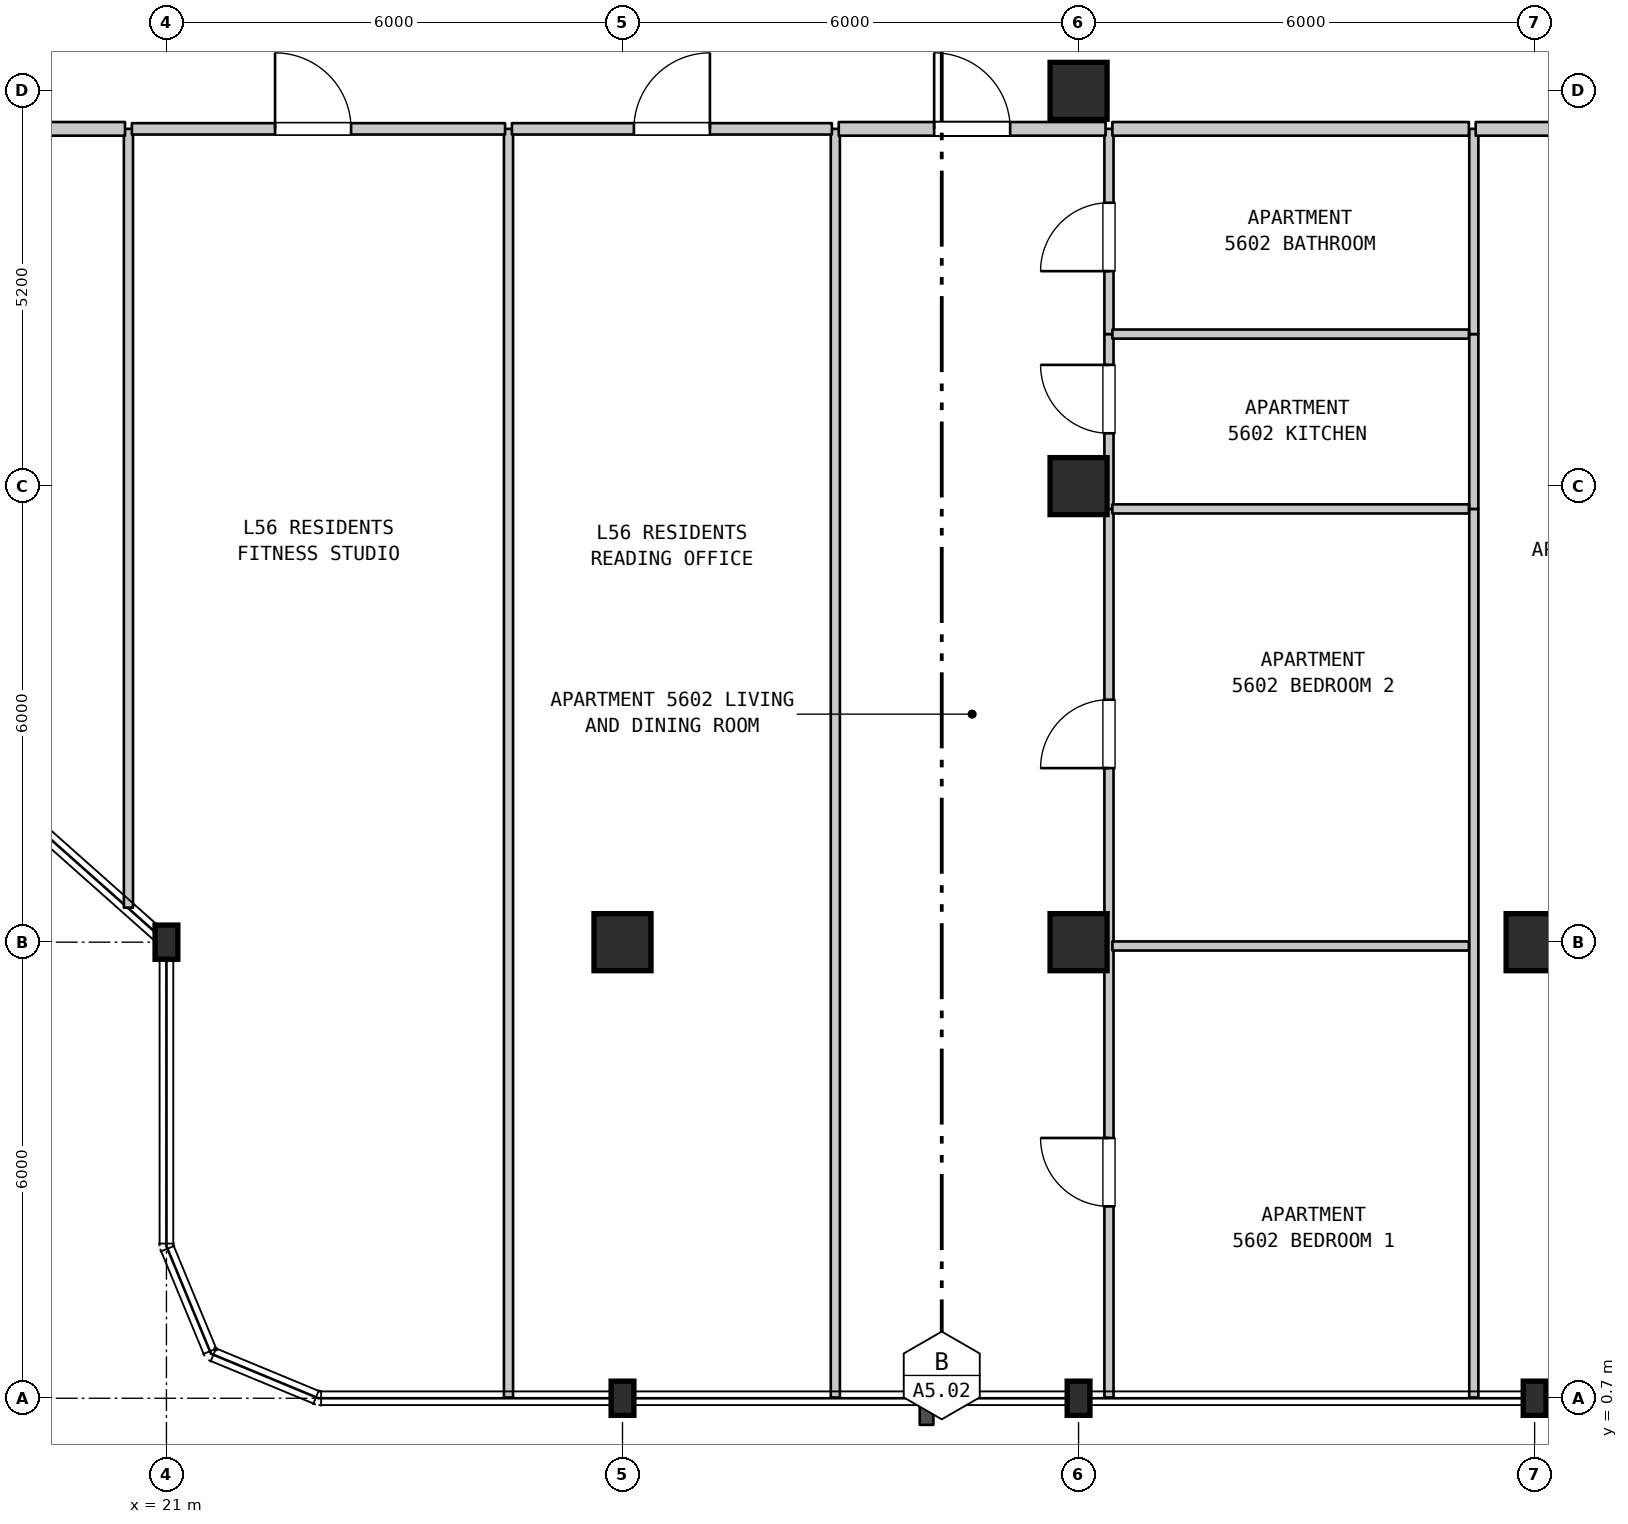
"""IFC4 building model, lengths in metres.
Left out: names, types, materials, properties, quantities, classifications, styles, units other than length and angle.
Written with IfcOpenShell. Run it as: python <this file> out.ifc"""

import sys

from ifc_helpers import new_model, si_unit, direction, frame, frame_2d, origin, origin_2d, place, context, subcontext, project, spatial, rectangle, i_section, extrude, element, fill, save


model = new_model("IFC4")
c1 = context("Model", 3, precision=1e-05, world=origin(), true_north=direction((0.0, 1.0)))
c2 = subcontext(c1, "Body", "Model", "MODEL_VIEW")
j1 = project(units=[si_unit("LENGTHUNIT", "METRE"), si_unit("PLANEANGLEUNIT", "RADIAN")], contexts=[c1])
p1 = place(None, origin())
s1 = spatial("IfcSite", under=j1, at=p1, CompositionType="ELEMENT")
p2 = place(p1, origin())
s2 = spatial("IfcBuilding", under=s1, at=p2, CompositionType="ELEMENT")
p3 = place(p2, frame((0.0, 0.0, 226.5)))
s3 = spatial("IfcBuildingStorey", under=s2, at=p3, CompositionType="ELEMENT", Elevation=226.5)
for number, where, z_axis, x_axis in (
    (1, (21.0, 6.7, 0.0), (0.0, 0.0, 1.0), (1.0, 0.0, 0.0)),
    (2, (27.0, 0.7, 0.0), (0.0, 0.0, 1.0), (1.0, 0.0, 0.0)),
):
    element("IfcColumn", number, at=place(p3, frame(where, z_axis=z_axis, x_axis=x_axis)), inside=s3, PredefinedType="COLUMN", context=c2, shape_type="SweptSolid", body=[
        extrude(i_section(OverallWidth=0.3, OverallDepth=0.45, WebThickness=0.014, FlangeThickness=0.026, FilletRadius=0.027, at=origin_2d()), origin(), (0.0, 0.0, 1.0), 3.7),
    ])
p4 = place(p3, frame((27.0, 6.7, 0.0), z_axis=(0.0, 0.0, 1.0), x_axis=(1.0, 0.0, 0.0)))
e3 = element("IfcColumn", 3, at=p4, inside=s3, PredefinedType="COLUMN", context=c2, shape_type="SweptSolid", body=[
    extrude(rectangle(XDim=0.75, YDim=0.75, at=origin_2d()), origin(), (0.0, 0.0, 1.0), 3.7),
])
p5 = place(p3, frame((33.0, 0.7, 0.0), z_axis=(0.0, 0.0, 1.0), x_axis=(1.0, 0.0, 0.0)))
e4 = element("IfcColumn", 4, at=p5, inside=s3, PredefinedType="COLUMN", context=c2, shape_type="SweptSolid", body=[
    extrude(i_section(OverallWidth=0.3, OverallDepth=0.45, WebThickness=0.014, FlangeThickness=0.026, FilletRadius=0.027, at=origin_2d()), origin(), (0.0, 0.0, 1.0), 3.7),
])
for number, where, z_axis, x_axis in (
    (5, (33.0, 6.7, 0.0), (0.0, 0.0, 1.0), (1.0, 0.0, 0.0)),
    (6, (33.0, 12.7, 0.0), (0.0, 0.0, 1.0), (1.0, 0.0, 0.0)),
    (7, (33.0, 17.9, 0.0), (0.0, 0.0, 1.0), (1.0, 0.0, 0.0)),
):
    element("IfcColumn", number, at=place(p3, frame(where, z_axis=z_axis, x_axis=x_axis)), inside=s3, PredefinedType="COLUMN", context=c2, shape_type="SweptSolid", body=[
        extrude(rectangle(XDim=0.75, YDim=0.75, at=origin_2d()), origin(), (0.0, 0.0, 1.0), 3.7),
    ])
p6 = place(p3, frame((39.0, 0.7, 0.0), z_axis=(0.0, 0.0, 1.0), x_axis=(1.0, 0.0, 0.0)))
e8 = element("IfcColumn", 8, at=p6, inside=s3, PredefinedType="COLUMN", context=c2, shape_type="SweptSolid", body=[
    extrude(i_section(OverallWidth=0.3, OverallDepth=0.45, WebThickness=0.014, FlangeThickness=0.026, FilletRadius=0.027, at=origin_2d()), origin(), (0.0, 0.0, 1.0), 3.7),
])
p7 = place(p3, frame((39.0, 6.7, 0.0), z_axis=(0.0, 0.0, 1.0), x_axis=(1.0, 0.0, 0.0)))
e9 = element("IfcColumn", 9, at=p7, inside=s3, PredefinedType="COLUMN", context=c2, shape_type="SweptSolid", body=[
    extrude(rectangle(XDim=0.75, YDim=0.75, at=origin_2d()), origin(), (0.0, 0.0, 1.0), 3.7),
])
p8 = place(p3, frame((20.5, 7.154, 0.0), z_axis=(0.0, 0.0, 1.0), x_axis=(0.0, 1.0, 0.0)))
e10 = element("IfcWall", 10, at=p8, inside=s3, PredefinedType="PARTITIONING", context=c2, shape_type="SweptSolid", body=[
    extrude(rectangle(XDim=10.246, YDim=0.12, at=frame_2d((5.123, 0.0))), origin(), (0.0, 0.0, 1.0), 3.39),
])
for number, where, z_axis, x_axis in (
    (11, (25.5, 0.71, 0.0), (0.0, 0.0, 1.0), (0.0, 1.0, 0.0)),
    (12, (29.8, 0.71, 0.0), (0.0, 0.0, 1.0), (0.0, 1.0, 0.0)),
):
    element("IfcWall", number, at=place(p3, frame(where, z_axis=z_axis, x_axis=x_axis)), inside=s3, PredefinedType="PARTITIONING", context=c2, shape_type="SweptSolid", body=[
        extrude(rectangle(XDim=16.69, YDim=0.12, at=frame_2d((8.345, 0.0))), origin(), (0.0, 0.0, 1.0), 3.39),
    ])
p9 = place(p3, frame((33.4, 0.71, 0.0), z_axis=(0.0, 0.0, 1.0), x_axis=(0.0, 1.0, 0.0)))
e13 = element("IfcWall", 13, at=p9, inside=s3, PredefinedType="PARTITIONING", context=c2, shape_type="SweptSolid", body=[
    extrude(rectangle(XDim=11.69, YDim=0.12, at=frame_2d((5.845, 0.0))), origin(), (0.0, 0.0, 1.0), 3.39),
])
p10 = place(p9, frame((2.514, 0.0, 0.0)))
e14 = element("IfcOpeningElement", 14, at=p10, cuts=e13, PredefinedType="OPENING", context=c2, shape_type="SweptSolid", body=[
    extrude(rectangle(XDim=0.9, YDim=2.15, at=frame_2d((0.45, 1.075))), frame((0.0, 0.07, 0.0), z_axis=(0.0, -1.0, 0.0), x_axis=(1.0, 0.0, 0.0)), (0.0, 0.0, 1.0), 0.14),
])
p11 = place(p9, frame((8.28, 0.0, 0.0)))
e15 = element("IfcOpeningElement", 15, at=p11, cuts=e13, PredefinedType="OPENING", context=c2, shape_type="SweptSolid", body=[
    extrude(rectangle(XDim=0.9, YDim=2.15, at=frame_2d((0.45, 1.075))), frame((0.0, 0.07, 0.0), z_axis=(0.0, -1.0, 0.0), x_axis=(1.0, 0.0, 0.0)), (0.0, 0.0, 1.0), 0.14),
])
p12 = place(p3, frame((33.4, 12.4, 0.0), z_axis=(0.0, 0.0, 1.0), x_axis=(0.0, 1.0, 0.0)))
e16 = element("IfcWall", 16, at=p12, inside=s3, PredefinedType="PARTITIONING", context=c2, shape_type="SweptSolid", body=[
    extrude(rectangle(XDim=2.3, YDim=0.12, at=frame_2d((1.15, 0.0))), origin(), (0.0, 0.0, 1.0), 3.39),
])
p13 = place(p12, frame((0.995, 0.0, 0.0)))
e17 = element("IfcOpeningElement", 17, at=p13, cuts=e16, PredefinedType="OPENING", context=c2, shape_type="SweptSolid", body=[
    extrude(rectangle(XDim=0.9, YDim=2.15, at=frame_2d((0.45, 1.075))), frame((0.0, 0.07, 0.0), z_axis=(0.0, -1.0, 0.0), x_axis=(1.0, 0.0, 0.0)), (0.0, 0.0, 1.0), 0.14),
])
p14 = place(p3, frame((33.4, 14.7, 0.0), z_axis=(0.0, 0.0, 1.0), x_axis=(0.0, 1.0, 0.0)))
e18 = element("IfcWall", 18, at=p14, inside=s3, PredefinedType="PARTITIONING", context=c2, shape_type="SweptSolid", body=[
    extrude(rectangle(XDim=2.7, YDim=0.12, at=frame_2d((1.35, 0.0))), origin(), (0.0, 0.0, 1.0), 3.39),
])
p15 = place(p14, frame((0.828, 0.0, 0.0)))
e19 = element("IfcOpeningElement", 19, at=p15, cuts=e18, PredefinedType="OPENING", context=c2, shape_type="SweptSolid", body=[
    extrude(rectangle(XDim=0.9, YDim=2.1, at=frame_2d((0.45, 1.05))), frame((0.0, 0.07, 0.0), z_axis=(0.0, -1.0, 0.0), x_axis=(1.0, 0.0, 0.0)), (0.0, 0.0, 1.0), 0.14),
])
p16 = place(p3, frame((38.2, 0.71, 0.0), z_axis=(0.0, 0.0, 1.0), x_axis=(0.0, 1.0, 0.0)))
e20 = element("IfcWall", 20, at=p16, inside=s3, PredefinedType="PARTITIONING", context=c2, shape_type="SweptSolid", body=[
    extrude(rectangle(XDim=11.69, YDim=0.12, at=frame_2d((5.845, 0.0))), origin(), (0.0, 0.0, 1.0), 3.39),
])
p17 = place(p3, frame((38.2, 12.4, 0.0), z_axis=(0.0, 0.0, 1.0), x_axis=(0.0, 1.0, 0.0)))
e21 = element("IfcWall", 21, at=p17, inside=s3, PredefinedType="PARTITIONING", context=c2, shape_type="SweptSolid", body=[
    extrude(rectangle(XDim=2.3, YDim=0.12, at=frame_2d((1.15, 0.0))), origin(), (0.0, 0.0, 1.0), 3.39),
])
p18 = place(p3, frame((38.2, 14.7, 0.0), z_axis=(0.0, 0.0, 1.0), x_axis=(0.0, 1.0, 0.0)))
e22 = element("IfcWall", 22, at=p18, inside=s3, PredefinedType="PARTITIONING", context=c2, shape_type="SweptSolid", body=[
    extrude(rectangle(XDim=2.7, YDim=0.12, at=frame_2d((1.35, 0.0))), origin(), (0.0, 0.0, 1.0), 3.39),
])
p19 = place(p3, frame((33.445, 6.65, 0.0), z_axis=(0.0, 0.0, 1.0), x_axis=(1.0, 0.0, 0.0)))
e23 = element("IfcWall", 23, at=p19, inside=s3, PredefinedType="PARTITIONING", context=c2, shape_type="SweptSolid", body=[
    extrude(rectangle(XDim=4.69, YDim=0.12, at=frame_2d((2.345, 0.0))), origin(), (0.0, 0.0, 1.0), 3.09),
])
for number, where, z_axis, x_axis in (
    (24, (33.445, 12.4, 0.0), (0.0, 0.0, 1.0), (1.0, 0.0, 0.0)),
    (25, (33.445, 14.7, 0.0), (0.0, 0.0, 1.0), (1.0, 0.0, 0.0)),
):
    element("IfcWall", number, at=place(p3, frame(where, z_axis=z_axis, x_axis=x_axis)), inside=s3, PredefinedType="PARTITIONING", context=c2, shape_type="SweptSolid", body=[
        extrude(rectangle(XDim=4.69, YDim=0.12, at=frame_2d((2.345, 0.0))), origin(), (0.0, 0.0, 1.0), 3.39),
    ])
p20 = place(p3, frame((18.595, 17.4, 0.0), z_axis=(0.0, 0.0, 1.0), x_axis=(1.0, 0.0, 0.0)))
e26 = element("IfcWall", 26, at=p20, inside=s3, PredefinedType="STANDARD", context=c2, shape_type="SweptSolid", body=[
    extrude(rectangle(XDim=1.86, YDim=0.18, at=frame_2d((0.93, 0.0))), origin(), (0.0, 0.0, 1.0), 3.39),
])
p21 = place(p3, frame((20.545, 17.4, 0.0), z_axis=(0.0, 0.0, 1.0), x_axis=(1.0, 0.0, 0.0)))
e27 = element("IfcWall", 27, at=p21, inside=s3, PredefinedType="STANDARD", context=c2, shape_type="SweptSolid", body=[
    extrude(rectangle(XDim=4.91, YDim=0.15, at=frame_2d((2.455, 0.0))), origin(), (0.0, 0.0, 1.0), 3.39),
])
p22 = place(p21, frame((1.884, 0.0, 0.0)))
e28 = element("IfcOpeningElement", 28, at=p22, cuts=e27, PredefinedType="OPENING", context=c2, shape_type="SweptSolid", body=[
    extrude(rectangle(XDim=1.0, YDim=2.15, at=frame_2d((0.5, 1.075))), frame((0.0, 0.085, 0.0), z_axis=(0.0, -1.0, 0.0), x_axis=(1.0, 0.0, 0.0)), (0.0, 0.0, 1.0), 0.17),
])
p23 = place(p3, frame((25.545, 17.4, 0.0), z_axis=(0.0, 0.0, 1.0), x_axis=(1.0, 0.0, 0.0)))
e29 = element("IfcWall", 29, at=p23, inside=s3, PredefinedType="STANDARD", context=c2, shape_type="SweptSolid", body=[
    extrude(rectangle(XDim=4.21, YDim=0.15, at=frame_2d((2.105, 0.0))), origin(), (0.0, 0.0, 1.0), 3.39),
])
p24 = place(p23, frame((1.605, 0.0, 0.0)))
e30 = element("IfcOpeningElement", 30, at=p24, cuts=e29, PredefinedType="OPENING", context=c2, shape_type="SweptSolid", body=[
    extrude(rectangle(XDim=1.0, YDim=2.15, at=frame_2d((0.5, 1.075))), frame((0.0, 0.085, 0.0), z_axis=(0.0, -1.0, 0.0), x_axis=(1.0, 0.0, 0.0)), (0.0, 0.0, 1.0), 0.17),
])
p25 = place(p3, frame((29.845, 17.4, 0.0), z_axis=(0.0, 0.0, 1.0), x_axis=(1.0, 0.0, 0.0)))
e31 = element("IfcWall", 31, at=p25, inside=s3, PredefinedType="STANDARD", context=c2, shape_type="SweptSolid", body=[
    extrude(rectangle(XDim=3.51, YDim=0.18, at=frame_2d((1.755, 0.0))), origin(), (0.0, 0.0, 1.0), 3.39),
])
p26 = place(p25, frame((1.255, 0.0, 0.0)))
e32 = element("IfcOpeningElement", 32, at=p26, cuts=e31, PredefinedType="OPENING", context=c2, shape_type="SweptSolid", body=[
    extrude(rectangle(XDim=1.0, YDim=2.15, at=frame_2d((0.5, 1.075))), frame((0.0, 0.1, 0.0), z_axis=(0.0, -1.0, 0.0), x_axis=(1.0, 0.0, 0.0)), (0.0, 0.0, 1.0), 0.2),
])
p27 = place(p3, frame((33.445, 17.4, 0.0), z_axis=(0.0, 0.0, 1.0), x_axis=(1.0, 0.0, 0.0)))
e33 = element("IfcWall", 33, at=p27, inside=s3, PredefinedType="STANDARD", context=c2, shape_type="SweptSolid", body=[
    extrude(rectangle(XDim=4.69, YDim=0.18, at=frame_2d((2.345, 0.0))), origin(), (0.0, 0.0, 1.0), 3.39),
])
p28 = place(p3, frame((38.225, 17.4, 0.0), z_axis=(0.0, 0.0, 1.0), x_axis=(1.0, 0.0, 0.0)))
e34 = element("IfcWall", 34, at=p28, inside=s3, PredefinedType="STANDARD", context=c2, shape_type="SweptSolid", body=[
    extrude(rectangle(XDim=3.51, YDim=0.18, at=frame_2d((1.755, 0.0))), origin(), (0.0, 0.0, 1.0), 3.39),
])
p29 = place(p28, frame((1.185, 0.0, 0.0)))
e35 = element("IfcOpeningElement", 35, at=p29, cuts=e34, PredefinedType="OPENING", context=c2, shape_type="SweptSolid", body=[
    extrude(rectangle(XDim=1.0, YDim=2.15, at=frame_2d((0.5, 1.075))), frame((0.0, 0.1, 0.0), z_axis=(0.0, -1.0, 0.0), x_axis=(1.0, 0.0, 0.0)), (0.0, 0.0, 1.0), 0.2),
])
p30 = place(p10, origin())
e36 = element("IfcDoor", 36, at=p30, inside=s3, OperationType="SINGLE_SWING_RIGHT", PredefinedType="DOOR", context=c2, shape_type="SweptSolid", body=[
    extrude(rectangle(XDim=0.9, YDim=2.15, at=frame_2d((0.45, 1.075))), frame((0.0, 0.025, 0.0), z_axis=(0.0, -1.0, 0.0), x_axis=(1.0, 0.0, 0.0)), (0.0, 0.0, 1.0), 0.05),
])
fill(e14, e36)
p31 = place(p11, origin())
e37 = element("IfcDoor", 37, at=p31, inside=s3, OperationType="SINGLE_SWING_LEFT", PredefinedType="DOOR", context=c2, shape_type="SweptSolid", body=[
    extrude(rectangle(XDim=0.9, YDim=2.15, at=frame_2d((0.45, 1.075))), frame((0.0, 0.025, 0.0), z_axis=(0.0, -1.0, 0.0), x_axis=(1.0, 0.0, 0.0)), (0.0, 0.0, 1.0), 0.05),
])
fill(e15, e37)
p32 = place(p13, origin())
e38 = element("IfcDoor", 38, at=p32, inside=s3, OperationType="SINGLE_SWING_RIGHT", PredefinedType="DOOR", context=c2, shape_type="SweptSolid", body=[
    extrude(rectangle(XDim=0.9, YDim=2.15, at=frame_2d((0.45, 1.075))), frame((0.0, 0.025, 0.0), z_axis=(0.0, -1.0, 0.0), x_axis=(1.0, 0.0, 0.0)), (0.0, 0.0, 1.0), 0.05),
])
fill(e17, e38)
p33 = place(p15, origin())
e39 = element("IfcDoor", 39, at=p33, inside=s3, OperationType="SINGLE_SWING_LEFT", PredefinedType="DOOR", context=c2, shape_type="SweptSolid", body=[
    extrude(rectangle(XDim=0.9, YDim=2.1, at=frame_2d((0.45, 1.05))), frame((0.0, 0.025, 0.0), z_axis=(0.0, -1.0, 0.0), x_axis=(1.0, 0.0, 0.0)), (0.0, 0.0, 1.0), 0.05),
])
fill(e19, e39)
p34 = place(p22, origin())
e40 = element("IfcDoor", 40, at=p34, inside=s3, OperationType="SINGLE_SWING_LEFT", PredefinedType="DOOR", context=c2, shape_type="SweptSolid", body=[
    extrude(rectangle(XDim=1.0, YDim=2.15, at=frame_2d((0.5, 1.075))), frame((0.0, 0.025, 0.0), z_axis=(0.0, -1.0, 0.0), x_axis=(1.0, 0.0, 0.0)), (0.0, 0.0, 1.0), 0.05),
])
fill(e28, e40)
p35 = place(p24, origin())
e41 = element("IfcDoor", 41, at=p35, inside=s3, OperationType="SINGLE_SWING_RIGHT", PredefinedType="DOOR", context=c2, shape_type="SweptSolid", body=[
    extrude(rectangle(XDim=1.0, YDim=2.15, at=frame_2d((0.5, 1.075))), frame((0.0, 0.025, 0.0), z_axis=(0.0, -1.0, 0.0), x_axis=(1.0, 0.0, 0.0)), (0.0, 0.0, 1.0), 0.05),
])
fill(e30, e41)
p36 = place(p26, origin())
e42 = element("IfcDoor", 42, at=p36, inside=s3, OperationType="SINGLE_SWING_LEFT", PredefinedType="DOOR", context=c2, shape_type="SweptSolid", body=[
    extrude(rectangle(XDim=1.0, YDim=2.15, at=frame_2d((0.5, 1.075))), frame((0.0, 0.025, 0.0), z_axis=(0.0, -1.0, 0.0), x_axis=(1.0, 0.0, 0.0)), (0.0, 0.0, 1.0), 0.05),
])
fill(e32, e42)
save(model, sys.argv[1])
